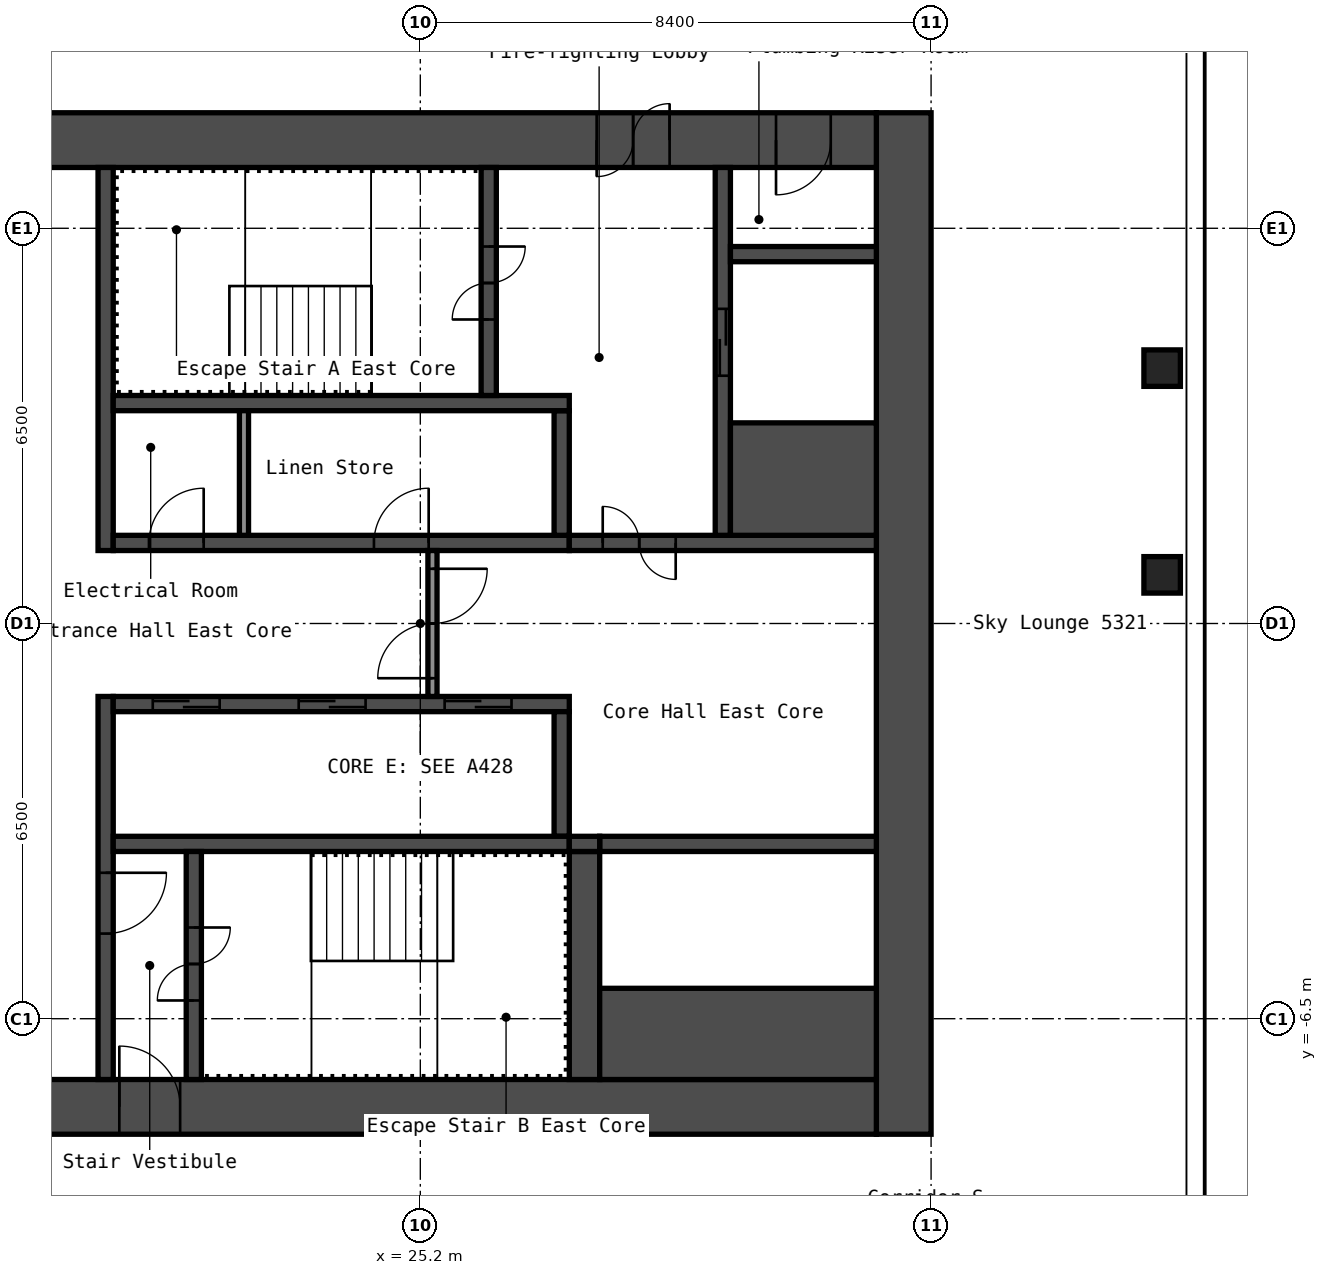
"""IFC4 building model, lengths in metres.
Left out: names, types, materials, properties, quantities, classifications, styles, units other than length and angle.
Written with IfcOpenShell. Run it as: python <this file> out.ifc"""

import sys

from ifc_helpers import new_model, si_unit, direction, frame, frame_2d, origin, origin_2d, place, context, subcontext, project, spatial, rectangle, hollow_rectangle, extrude, element, fill, save


model = new_model("IFC4")
c1 = context("Model", 3, precision=1e-05, world=origin(), true_north=direction((0.0, 1.0)))
c2 = subcontext(c1, "Body", "Model", "MODEL_VIEW")
j1 = project(units=[si_unit("LENGTHUNIT", "METRE"), si_unit("PLANEANGLEUNIT", "RADIAN")], contexts=[c1])
p1 = place(None, origin())
s1 = spatial("IfcSite", under=j1, at=p1, CompositionType="ELEMENT")
p2 = place(p1, origin())
s2 = spatial("IfcBuilding", under=s1, at=p2, CompositionType="ELEMENT")
p3 = place(p2, frame((0.0, 0.0, 189.8)))
s3 = spatial("IfcBuildingStorey", under=s2, at=p3, CompositionType="ELEMENT", Elevation=189.8)
for number, where, z_axis, x_axis in (
    (1, (37.4, 0.8, 0.0), (0.0, 0.0, 1.0), (1.0, 0.0, 0.0)),
    (2, (37.4, 4.2, 0.0), (0.0, 0.0, 1.0), (1.0, 0.0, 0.0)),
):
    element("IfcColumn", number, at=place(p3, frame(where, z_axis=z_axis, x_axis=x_axis)), inside=s3, PredefinedType="COLUMN", context=c2, shape_type="SweptSolid", body=[
        extrude(hollow_rectangle(XDim=0.6, YDim=0.6, WallThickness=0.025, InnerFilletRadius=0.038, OuterFilletRadius=0.062, at=origin_2d()), origin(), (0.0, 0.0, 1.0), 2.75),
    ])
p4 = place(p3, frame((33.15, -8.4, 0.0), z_axis=(0.0, 0.0, 1.0), x_axis=(0.0, 1.0, 0.0)))
e3 = element("IfcWall", 3, at=p4, inside=s3, PredefinedType="SHEAR", context=c2, shape_type="SweptSolid", body=[
    extrude(rectangle(XDim=16.8, YDim=0.9, at=frame_2d((8.4, 0.0))), origin(), (0.0, 0.0, 1.0), 2.75),
])
p5 = place(p3, frame((17.7, 7.95, 0.0), z_axis=(0.0, 0.0, 1.0), x_axis=(1.0, 0.0, 0.0)))
e4 = element("IfcWall", 4, at=p5, inside=s3, PredefinedType="SHEAR", context=c2, shape_type="SweptSolid", body=[
    extrude(rectangle(XDim=15.0, YDim=0.9, at=frame_2d((7.5, 0.0))), origin(), (0.0, 0.0, 1.0), 2.75),
])
p6 = place(p5, frame((10.4, 0.0, 0.0)))
e5 = element("IfcOpeningElement", 5, at=p6, cuts=e4, PredefinedType="OPENING", context=c2, shape_type="SweptSolid", body=[
    extrude(rectangle(XDim=1.2, YDim=2.1, at=frame_2d((0.6, 1.05))), frame((0.0, 0.46, 0.0), z_axis=(0.0, -1.0, 0.0), x_axis=(1.0, 0.0, 0.0)), (0.0, 0.0, 1.0), 0.92),
])
p7 = place(p5, frame((13.35, 0.0, 0.0)))
e6 = element("IfcOpeningElement", 6, at=p7, cuts=e4, PredefinedType="OPENING", context=c2, shape_type="SweptSolid", body=[
    extrude(rectangle(XDim=0.9, YDim=2.1, at=frame_2d((0.45, 1.05))), frame((0.0, 0.46, 0.0), z_axis=(0.0, -1.0, 0.0), x_axis=(1.0, 0.0, 0.0)), (0.0, 0.0, 1.0), 0.92),
])
p8 = place(p3, frame((17.7, -7.95, 0.0), z_axis=(0.0, 0.0, 1.0), x_axis=(1.0, 0.0, 0.0)))
e7 = element("IfcWall", 7, at=p8, inside=s3, PredefinedType="SHEAR", context=c2, shape_type="SweptSolid", body=[
    extrude(rectangle(XDim=15.0, YDim=0.9, at=frame_2d((7.5, 0.0))), origin(), (0.0, 0.0, 1.0), 2.75),
])
p9 = place(p8, frame((2.55, 0.0, 0.0)))
e8 = element("IfcOpeningElement", 8, at=p9, cuts=e7, PredefinedType="OPENING", context=c2, shape_type="SweptSolid", body=[
    extrude(rectangle(XDim=1.0, YDim=2.1, at=frame_2d((0.5, 1.05))), frame((0.0, 0.46, 0.0), z_axis=(0.0, -1.0, 0.0), x_axis=(1.0, 0.0, 0.0)), (0.0, 0.0, 1.0), 0.92),
])
p10 = place(p3, frame((20.025, 1.2, 0.0), z_axis=(0.0, 0.0, 1.0), x_axis=(0.0, 1.0, 0.0)))
e9 = element("IfcWall", 9, at=p10, inside=s3, PredefinedType="SHEAR", context=c2, shape_type="SweptSolid", body=[
    extrude(rectangle(XDim=6.3, YDim=0.25, at=frame_2d((3.15, 0.0))), origin(), (0.0, 0.0, 1.0), 2.75),
])
p11 = place(p3, frame((20.025, -7.5, 0.0), z_axis=(0.0, 0.0, 1.0), x_axis=(0.0, 1.0, 0.0)))
e10 = element("IfcWall", 10, at=p11, inside=s3, PredefinedType="SHEAR", context=c2, shape_type="SweptSolid", body=[
    extrude(rectangle(XDim=6.3, YDim=0.25, at=frame_2d((3.15, 0.0))), origin(), (0.0, 0.0, 1.0), 2.75),
])
p12 = place(p11, frame((2.4, 0.0, 0.0)))
e11 = element("IfcOpeningElement", 11, at=p12, cuts=e10, PredefinedType="OPENING", context=c2, shape_type="SweptSolid", body=[
    extrude(rectangle(XDim=1.0, YDim=2.1, at=frame_2d((0.5, 1.05))), frame((0.0, 0.135, 0.0), z_axis=(0.0, -1.0, 0.0), x_axis=(1.0, 0.0, 0.0)), (0.0, 0.0, 1.0), 0.27),
])
p13 = place(p3, frame((20.15, 1.325, 0.0), z_axis=(0.0, 0.0, 1.0), x_axis=(1.0, 0.0, 0.0)))
e12 = element("IfcWall", 12, at=p13, inside=s3, PredefinedType="SHEAR", context=c2, shape_type="SweptSolid", body=[
    extrude(rectangle(XDim=7.5, YDim=0.25, at=frame_2d((3.75, 0.0))), origin(), (0.0, 0.0, 1.0), 2.75),
])
p14 = place(p13, frame((0.587, 0.0, 0.0)))
e13 = element("IfcOpeningElement", 13, at=p14, cuts=e12, PredefinedType="OPENING", context=c2, shape_type="SweptSolid", body=[
    extrude(rectangle(XDim=0.9, YDim=2.1, at=frame_2d((0.45, 1.05))), frame((0.0, 0.135, 0.0), z_axis=(0.0, -1.0, 0.0), x_axis=(1.0, 0.0, 0.0)), (0.0, 0.0, 1.0), 0.27),
])
p15 = place(p13, frame((4.288, 0.0, 0.0)))
e14 = element("IfcOpeningElement", 14, at=p15, cuts=e12, PredefinedType="OPENING", context=c2, shape_type="SweptSolid", body=[
    extrude(rectangle(XDim=0.9, YDim=2.1, at=frame_2d((0.45, 1.05))), frame((0.0, 0.135, 0.0), z_axis=(0.0, -1.0, 0.0), x_axis=(1.0, 0.0, 0.0)), (0.0, 0.0, 1.0), 0.27),
])
p16 = place(p3, frame((27.525, 1.45, 0.0), z_axis=(0.0, 0.0, 1.0), x_axis=(0.0, 1.0, 0.0)))
e15 = element("IfcWall", 15, at=p16, inside=s3, PredefinedType="SHEAR", context=c2, shape_type="SweptSolid", body=[
    extrude(rectangle(XDim=2.05, YDim=0.25, at=frame_2d((1.025, 0.0))), origin(), (0.0, 0.0, 1.0), 2.75),
])
p17 = place(p3, frame((20.15, 3.625, 0.0), z_axis=(0.0, 0.0, 1.0), x_axis=(1.0, 0.0, 0.0)))
e16 = element("IfcWall", 16, at=p17, inside=s3, PredefinedType="SHEAR", context=c2, shape_type="SweptSolid", body=[
    extrude(rectangle(XDim=7.5, YDim=0.25, at=frame_2d((3.75, 0.0))), origin(), (0.0, 0.0, 1.0), 2.75),
])
p18 = place(p3, frame((26.325, 3.75, 0.0), z_axis=(0.0, 0.0, 1.0), x_axis=(0.0, 1.0, 0.0)))
e17 = element("IfcWall", 17, at=p18, inside=s3, PredefinedType="SHEAR", context=c2, shape_type="SweptSolid", body=[
    extrude(rectangle(XDim=3.75, YDim=0.25, at=frame_2d((1.875, 0.0))), origin(), (0.0, 0.0, 1.0), 2.75),
])
p19 = place(p18, frame((1.25, 0.0, 0.0)))
e18 = element("IfcOpeningElement", 18, at=p19, cuts=e17, PredefinedType="OPENING", context=c2, shape_type="SweptSolid", body=[
    extrude(rectangle(XDim=1.2, YDim=2.1, at=frame_2d((0.6, 1.05))), frame((0.0, 0.135, 0.0), z_axis=(0.0, -1.0, 0.0), x_axis=(1.0, 0.0, 0.0)), (0.0, 0.0, 1.0), 0.27),
])
p20 = place(p3, frame((27.65, 1.325, 0.0), z_axis=(0.0, 0.0, 1.0), x_axis=(1.0, 0.0, 0.0)))
e19 = element("IfcWall", 19, at=p20, inside=s3, PredefinedType="SHEAR", context=c2, shape_type="SweptSolid", body=[
    extrude(rectangle(XDim=5.05, YDim=0.25, at=frame_2d((2.525, 0.0))), origin(), (0.0, 0.0, 1.0), 2.75),
])
p21 = place(p20, frame((0.55, 0.0, 0.0)))
e20 = element("IfcOpeningElement", 20, at=p21, cuts=e19, PredefinedType="OPENING", context=c2, shape_type="SweptSolid", body=[
    extrude(rectangle(XDim=1.2, YDim=2.1, at=frame_2d((0.6, 1.05))), frame((0.0, 0.135, 0.0), z_axis=(0.0, -1.0, 0.0), x_axis=(1.0, 0.0, 0.0)), (0.0, 0.0, 1.0), 0.27),
])
p22 = place(p3, frame((30.175, 1.45, 0.0), z_axis=(0.0, 0.0, 1.0), x_axis=(0.0, 1.0, 0.0)))
e21 = element("IfcWall", 21, at=p22, inside=s3, PredefinedType="SHEAR", context=c2, shape_type="SweptSolid", body=[
    extrude(rectangle(XDim=6.05, YDim=0.25, at=frame_2d((3.025, 0.0))), origin(), (0.0, 0.0, 1.0), 2.75),
])
p23 = place(p22, frame((2.625, 0.0, 0.0)))
e22 = element("IfcOpeningElement", 22, at=p23, cuts=e21, PredefinedType="OPENING", context=c2, shape_type="SweptSolid", body=[
    extrude(rectangle(XDim=1.1, YDim=2.1, at=frame_2d((0.55, 1.05))), frame((0.0, 0.135, 0.0), z_axis=(0.0, -1.0, 0.0), x_axis=(1.0, 0.0, 0.0)), (0.0, 0.0, 1.0), 0.27),
])
p24 = place(p3, frame((30.3, 2.375, 0.0), z_axis=(0.0, 0.0, 1.0), x_axis=(1.0, 0.0, 0.0)))
e23 = element("IfcWall", 23, at=p24, inside=s3, PredefinedType="SHEAR", context=c2, shape_type="SweptSolid", body=[
    extrude(rectangle(XDim=2.4, YDim=1.85, at=frame_2d((1.2, 0.0))), origin(), (0.0, 0.0, 1.0), 2.75),
])
p25 = place(p3, frame((30.3, 6.075, 0.0), z_axis=(0.0, 0.0, 1.0), x_axis=(1.0, 0.0, 0.0)))
e24 = element("IfcWall", 24, at=p25, inside=s3, PredefinedType="SHEAR", context=c2, shape_type="SweptSolid", body=[
    extrude(rectangle(XDim=2.4, YDim=0.25, at=frame_2d((1.2, 0.0))), origin(), (0.0, 0.0, 1.0), 2.75),
])
p26 = place(p3, frame((20.15, -1.325, 0.0), z_axis=(0.0, 0.0, 1.0), x_axis=(1.0, 0.0, 0.0)))
e25 = element("IfcWall", 25, at=p26, inside=s3, PredefinedType="SHEAR", context=c2, shape_type="SweptSolid", body=[
    extrude(rectangle(XDim=7.5, YDim=0.25, at=frame_2d((3.75, 0.0))), origin(), (0.0, 0.0, 1.0), 2.75),
])
p27 = place(p26, frame((0.65, 0.0, 0.0)))
e26 = element("IfcOpeningElement", 26, at=p27, cuts=e25, PredefinedType="OPENING", context=c2, shape_type="SweptSolid", body=[
    extrude(rectangle(XDim=1.1, YDim=2.1, at=frame_2d((0.55, 1.05))), frame((0.0, 0.135, 0.0), z_axis=(0.0, -1.0, 0.0), x_axis=(1.0, 0.0, 0.0)), (0.0, 0.0, 1.0), 0.27),
])
p28 = place(p26, frame((3.05, 0.0, 0.0)))
e27 = element("IfcOpeningElement", 27, at=p28, cuts=e25, PredefinedType="OPENING", context=c2, shape_type="SweptSolid", body=[
    extrude(rectangle(XDim=1.1, YDim=2.1, at=frame_2d((0.55, 1.05))), frame((0.0, 0.135, 0.0), z_axis=(0.0, -1.0, 0.0), x_axis=(1.0, 0.0, 0.0)), (0.0, 0.0, 1.0), 0.27),
])
p29 = place(p26, frame((5.45, 0.0, 0.0)))
e28 = element("IfcOpeningElement", 28, at=p29, cuts=e25, PredefinedType="OPENING", context=c2, shape_type="SweptSolid", body=[
    extrude(rectangle(XDim=1.1, YDim=2.1, at=frame_2d((0.55, 1.05))), frame((0.0, 0.135, 0.0), z_axis=(0.0, -1.0, 0.0), x_axis=(1.0, 0.0, 0.0)), (0.0, 0.0, 1.0), 0.27),
])
p30 = place(p3, frame((27.525, -3.5, 0.0), z_axis=(0.0, 0.0, 1.0), x_axis=(0.0, 1.0, 0.0)))
e29 = element("IfcWall", 29, at=p30, inside=s3, PredefinedType="SHEAR", context=c2, shape_type="SweptSolid", body=[
    extrude(rectangle(XDim=2.05, YDim=0.25, at=frame_2d((1.025, 0.0))), origin(), (0.0, 0.0, 1.0), 2.75),
])
p31 = place(p3, frame((20.15, -3.625, 0.0), z_axis=(0.0, 0.0, 1.0), x_axis=(1.0, 0.0, 0.0)))
e30 = element("IfcWall", 30, at=p31, inside=s3, PredefinedType="SHEAR", context=c2, shape_type="SweptSolid", body=[
    extrude(rectangle(XDim=7.5, YDim=0.25, at=frame_2d((3.75, 0.0))), origin(), (0.0, 0.0, 1.0), 2.75),
])
p32 = place(p3, frame((21.475, -7.5, 0.0), z_axis=(0.0, 0.0, 1.0), x_axis=(0.0, 1.0, 0.0)))
e31 = element("IfcWall", 31, at=p32, inside=s3, PredefinedType="SHEAR", context=c2, shape_type="SweptSolid", body=[
    extrude(rectangle(XDim=3.75, YDim=0.25, at=frame_2d((1.875, 0.0))), origin(), (0.0, 0.0, 1.0), 2.75),
])
p33 = place(p32, frame((1.3, 0.0, 0.0)))
e32 = element("IfcOpeningElement", 32, at=p33, cuts=e31, PredefinedType="OPENING", context=c2, shape_type="SweptSolid", body=[
    extrude(rectangle(XDim=1.2, YDim=2.1, at=frame_2d((0.6, 1.05))), frame((0.0, 0.135, 0.0), z_axis=(0.0, -1.0, 0.0), x_axis=(1.0, 0.0, 0.0)), (0.0, 0.0, 1.0), 0.27),
])
p34 = place(p3, frame((27.9, -7.5, 0.0), z_axis=(0.0, 0.0, 1.0), x_axis=(0.0, 1.0, 0.0)))
e33 = element("IfcWall", 33, at=p34, inside=s3, PredefinedType="SHEAR", context=c2, shape_type="SweptSolid", body=[
    extrude(rectangle(XDim=3.75, YDim=0.5, at=frame_2d((1.875, 0.0))), origin(), (0.0, 0.0, 1.0), 2.75),
])
p35 = place(p3, frame((28.15, -3.625, 0.0), z_axis=(0.0, 0.0, 1.0), x_axis=(1.0, 0.0, 0.0)))
e34 = element("IfcWall", 34, at=p35, inside=s3, PredefinedType="SHEAR", context=c2, shape_type="SweptSolid", body=[
    extrude(rectangle(XDim=4.55, YDim=0.25, at=frame_2d((2.275, 0.0))), origin(), (0.0, 0.0, 1.0), 2.75),
])
p36 = place(p3, frame((28.15, -6.75, 0.0), z_axis=(0.0, 0.0, 1.0), x_axis=(1.0, 0.0, 0.0)))
e35 = element("IfcWall", 35, at=p36, inside=s3, PredefinedType="SHEAR", context=c2, shape_type="SweptSolid", body=[
    extrude(rectangle(XDim=4.55, YDim=1.5, at=frame_2d((2.275, 0.0))), origin(), (0.0, 0.0, 1.0), 2.75),
])
p37 = place(p3, frame((27.65, -3.625, 0.0), z_axis=(0.0, 0.0, 1.0), x_axis=(1.0, 0.0, 0.0)))
e36 = element("IfcWall", 36, at=p37, inside=s3, PredefinedType="SHEAR", context=c2, shape_type="SweptSolid", body=[
    extrude(rectangle(XDim=0.5, YDim=0.25, at=frame_2d((0.25, 0.0))), origin(), (0.0, 0.0, 1.0), 2.75),
])
p38 = place(p3, frame((25.4, -1.2, 0.0), z_axis=(0.0, 0.0, 1.0), x_axis=(0.0, 1.0, 0.0)))
e37 = element("IfcWall", 37, at=p38, inside=s3, PredefinedType="PARTITIONING", context=c2, shape_type="SweptSolid", body=[
    extrude(rectangle(XDim=2.4, YDim=0.15, at=frame_2d((1.2, 0.0))), origin(), (0.0, 0.0, 1.0), 2.75),
])
p39 = place(p38, frame((0.3, 0.0, 0.0)))
e38 = element("IfcOpeningElement", 38, at=p39, cuts=e37, PredefinedType="OPENING", context=c2, shape_type="SweptSolid", body=[
    extrude(rectangle(XDim=1.8, YDim=2.1, at=frame_2d((0.9, 1.05))), frame((0.0, 0.085, 0.0), z_axis=(0.0, -1.0, 0.0), x_axis=(1.0, 0.0, 0.0)), (0.0, 0.0, 1.0), 0.17),
])
p40 = place(p3, frame((22.3, 1.45, 0.0), z_axis=(0.0, 0.0, 1.0), x_axis=(0.0, 1.0, 0.0)))
e39 = element("IfcWall", 39, at=p40, inside=s3, PredefinedType="PARTITIONING", context=c2, shape_type="SweptSolid", body=[
    extrude(rectangle(XDim=2.05, YDim=0.15, at=frame_2d((1.025, 0.0))), origin(), (0.0, 0.0, 1.0), 2.75),
])
p41 = place(p6, origin())
e40 = element("IfcDoor", 40, at=p41, inside=s3, OperationType="DOUBLE_DOOR_SINGLE_SWING", PredefinedType="DOOR", context=c2, shape_type="SweptSolid", body=[
    extrude(rectangle(XDim=1.2, YDim=2.1, at=frame_2d((0.6, 1.05))), frame((0.0, 0.025, 0.0), z_axis=(0.0, -1.0, 0.0), x_axis=(1.0, 0.0, 0.0)), (0.0, 0.0, 1.0), 0.05),
])
fill(e5, e40)
p42 = place(p7, origin())
e41 = element("IfcDoor", 41, at=p42, inside=s3, OperationType="SINGLE_SWING_LEFT", PredefinedType="DOOR", context=c2, shape_type="SweptSolid", body=[
    extrude(rectangle(XDim=0.9, YDim=2.1, at=frame_2d((0.45, 1.05))), frame((0.0, 0.025, 0.0), z_axis=(0.0, -1.0, 0.0), x_axis=(1.0, 0.0, 0.0)), (0.0, 0.0, 1.0), 0.05),
])
fill(e6, e41)
p43 = place(p9, origin())
e42 = element("IfcDoor", 42, at=p43, inside=s3, OperationType="SINGLE_SWING_RIGHT", PredefinedType="DOOR", context=c2, shape_type="SweptSolid", body=[
    extrude(rectangle(XDim=1.0, YDim=2.1, at=frame_2d((0.5, 1.05))), frame((0.0, 0.025, 0.0), z_axis=(0.0, -1.0, 0.0), x_axis=(1.0, 0.0, 0.0)), (0.0, 0.0, 1.0), 0.05),
])
fill(e8, e42)
p44 = place(p19, origin())
e43 = element("IfcDoor", 43, at=p44, inside=s3, OperationType="DOUBLE_DOOR_SINGLE_SWING", PredefinedType="DOOR", context=c2, shape_type="SweptSolid", body=[
    extrude(rectangle(XDim=1.2, YDim=2.1, at=frame_2d((0.6, 1.05))), frame((0.0, 0.025, 0.0), z_axis=(0.0, -1.0, 0.0), x_axis=(1.0, 0.0, 0.0)), (0.0, 0.0, 1.0), 0.05),
])
fill(e18, e43)
p45 = place(p33, origin())
e44 = element("IfcDoor", 44, at=p45, inside=s3, OperationType="DOUBLE_DOOR_SINGLE_SWING", PredefinedType="DOOR", context=c2, shape_type="SweptSolid", body=[
    extrude(rectangle(XDim=1.2, YDim=2.1, at=frame_2d((0.6, 1.05))), frame((0.0, 0.025, 0.0), z_axis=(0.0, -1.0, 0.0), x_axis=(1.0, 0.0, 0.0)), (0.0, 0.0, 1.0), 0.05),
])
fill(e32, e44)
p46 = place(p12, origin())
e45 = element("IfcDoor", 45, at=p46, inside=s3, OperationType="SINGLE_SWING_RIGHT", PredefinedType="DOOR", context=c2, shape_type="SweptSolid", body=[
    extrude(rectangle(XDim=1.0, YDim=2.1, at=frame_2d((0.5, 1.05))), frame((0.0, 0.025, 0.0), z_axis=(0.0, -1.0, 0.0), x_axis=(1.0, 0.0, 0.0)), (0.0, 0.0, 1.0), 0.05),
])
fill(e11, e45)
p47 = place(p21, origin())
e46 = element("IfcDoor", 46, at=p47, inside=s3, OperationType="DOUBLE_DOOR_SINGLE_SWING", PredefinedType="DOOR", context=c2, shape_type="SweptSolid", body=[
    extrude(rectangle(XDim=1.2, YDim=2.1, at=frame_2d((0.6, 1.05))), frame((0.0, 0.025, 0.0), z_axis=(0.0, -1.0, 0.0), x_axis=(1.0, 0.0, 0.0)), (0.0, 0.0, 1.0), 0.05),
])
fill(e20, e46)
p48 = place(p39, origin())
e47 = element("IfcDoor", 47, at=p48, inside=s3, OperationType="DOUBLE_DOOR_SINGLE_SWING", PredefinedType="DOOR", context=c2, shape_type="SweptSolid", body=[
    extrude(rectangle(XDim=1.8, YDim=2.1, at=frame_2d((0.9, 1.05))), frame((0.0, 0.025, 0.0), z_axis=(0.0, -1.0, 0.0), x_axis=(1.0, 0.0, 0.0)), (0.0, 0.0, 1.0), 0.05),
])
fill(e38, e47)
p49 = place(p14, origin())
e48 = element("IfcDoor", 48, at=p49, inside=s3, OperationType="SINGLE_SWING_LEFT", PredefinedType="DOOR", context=c2, shape_type="SweptSolid", body=[
    extrude(rectangle(XDim=0.9, YDim=2.1, at=frame_2d((0.45, 1.05))), frame((0.0, 0.025, 0.0), z_axis=(0.0, -1.0, 0.0), x_axis=(1.0, 0.0, 0.0)), (0.0, 0.0, 1.0), 0.05),
])
fill(e13, e48)
p50 = place(p15, origin())
e49 = element("IfcDoor", 49, at=p50, inside=s3, OperationType="SINGLE_SWING_LEFT", PredefinedType="DOOR", context=c2, shape_type="SweptSolid", body=[
    extrude(rectangle(XDim=0.9, YDim=2.1, at=frame_2d((0.45, 1.05))), frame((0.0, 0.025, 0.0), z_axis=(0.0, -1.0, 0.0), x_axis=(1.0, 0.0, 0.0)), (0.0, 0.0, 1.0), 0.05),
])
fill(e14, e49)
p51 = place(p27, origin())
e50 = element("IfcDoor", 50, at=p51, inside=s3, OperationType="DOUBLE_DOOR_SLIDING", PredefinedType="DOOR", context=c2, shape_type="SweptSolid", body=[
    extrude(rectangle(XDim=1.1, YDim=2.1, at=frame_2d((0.55, 1.05))), frame((0.0, 0.025, 0.0), z_axis=(0.0, -1.0, 0.0), x_axis=(1.0, 0.0, 0.0)), (0.0, 0.0, 1.0), 0.05),
])
fill(e26, e50)
p52 = place(p28, origin())
e51 = element("IfcDoor", 51, at=p52, inside=s3, OperationType="DOUBLE_DOOR_SLIDING", PredefinedType="DOOR", context=c2, shape_type="SweptSolid", body=[
    extrude(rectangle(XDim=1.1, YDim=2.1, at=frame_2d((0.55, 1.05))), frame((0.0, 0.025, 0.0), z_axis=(0.0, -1.0, 0.0), x_axis=(1.0, 0.0, 0.0)), (0.0, 0.0, 1.0), 0.05),
])
fill(e27, e51)
p53 = place(p29, origin())
e52 = element("IfcDoor", 52, at=p53, inside=s3, OperationType="DOUBLE_DOOR_SLIDING", PredefinedType="DOOR", context=c2, shape_type="SweptSolid", body=[
    extrude(rectangle(XDim=1.1, YDim=2.1, at=frame_2d((0.55, 1.05))), frame((0.0, 0.025, 0.0), z_axis=(0.0, -1.0, 0.0), x_axis=(1.0, 0.0, 0.0)), (0.0, 0.0, 1.0), 0.05),
])
fill(e28, e52)
p54 = place(p23, origin())
e53 = element("IfcDoor", 53, at=p54, inside=s3, OperationType="DOUBLE_DOOR_SLIDING", PredefinedType="DOOR", context=c2, shape_type="SweptSolid", body=[
    extrude(rectangle(XDim=1.1, YDim=2.1, at=frame_2d((0.55, 1.05))), frame((0.0, 0.025, 0.0), z_axis=(0.0, -1.0, 0.0), x_axis=(1.0, 0.0, 0.0)), (0.0, 0.0, 1.0), 0.05),
])
fill(e22, e53)
save(model, sys.argv[1])
